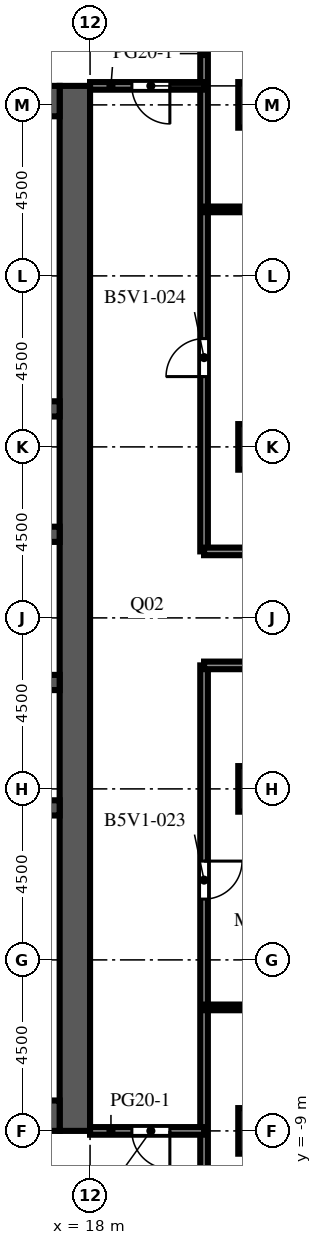
"""IFC4 building model, lengths in metres.
Left out: names, types, materials, properties, quantities, classifications, styles, units other than length and angle.
Written with IfcOpenShell. Run it as: python <this file> out.ifc"""

import sys

from ifc_helpers import new_model, si_unit, direction, frame, frame_2d, origin, origin_2d, place, context, subcontext, project, spatial, rectangle, extrude, element, fill, save


model = new_model("IFC4")
c1 = context("Model", 3, precision=1e-05, world=origin(), true_north=direction((0.0, 1.0)))
c2 = subcontext(c1, "Body", "Model", "MODEL_VIEW")
j1 = project(units=[si_unit("LENGTHUNIT", "METRE"), si_unit("PLANEANGLEUNIT", "RADIAN")], contexts=[c1])
p1 = place(None, origin())
s1 = spatial("IfcSite", under=j1, at=p1, CompositionType="ELEMENT")
p2 = place(p1, origin())
s2 = spatial("IfcBuilding", under=s1, at=p2, CompositionType="ELEMENT")
p3 = place(p2, frame((0.0, 0.0, 169.1)))
s3 = spatial("IfcBuildingStorey", under=s2, at=p3, CompositionType="ELEMENT", Elevation=169.1)
for number, where, z_axis, x_axis in (
    (1, (22.5, -9.0, 0.0), (0.0, 0.0, 1.0), (1.0, 0.0, 0.0)),
    (2, (22.5, 0.0, 0.0), (0.0, 0.0, 1.0), (1.0, 0.0, 0.0)),
    (3, (22.5, 9.0, 0.0), (0.0, 0.0, 1.0), (1.0, 0.0, 0.0)),
    (4, (22.5, 18.0, 0.0), (0.0, 0.0, 1.0), (1.0, 0.0, 0.0)),
):
    element("IfcColumn", number, at=place(p3, frame(where, z_axis=z_axis, x_axis=x_axis)), inside=s3, PredefinedType="COLUMN", context=c2, shape_type="SweptSolid", body=[
        extrude(rectangle(XDim=1.2, YDim=1.2, at=origin_2d()), origin(), (0.0, 0.0, 1.0), 4.1),
    ])
p4 = place(p3, frame((17.6, -9.0, 0.0), z_axis=(0.0, 0.0, 1.0), x_axis=(0.0, 1.0, 0.0)))
e5 = element("IfcWall", 5, at=p4, inside=s3, PredefinedType="SHEAR", context=c2, shape_type="SweptSolid", body=[
    extrude(rectangle(XDim=27.5, YDim=0.8, at=frame_2d((13.75, 0.0))), origin(), (0.0, 0.0, 1.0), 4.1),
])
p5 = place(p4, frame((12.55, 0.0, 0.0)))
e6 = element("IfcOpeningElement", 6, at=p5, cuts=e5, PredefinedType="OPENING", context=c2, shape_type="SweptSolid", body=[
    extrude(rectangle(XDim=2.4, YDim=2.4, at=frame_2d((1.2, 1.2))), frame((0.0, 0.41, 0.0), z_axis=(0.0, -1.0, 0.0), x_axis=(1.0, 0.0, 0.0)), (0.0, 0.0, 1.0), 0.82),
])
p6 = place(p4, frame((6.825, 0.0, 0.0)))
e7 = element("IfcOpeningElement", 7, at=p6, cuts=e5, PredefinedType="OPENING", context=c2, shape_type="SweptSolid", body=[
    extrude(rectangle(XDim=1.2, YDim=2.1, at=frame_2d((0.6, 1.05))), frame((0.0, 0.41, 0.0), z_axis=(0.0, -1.0, 0.0), x_axis=(1.0, 0.0, 0.0)), (0.0, 0.0, 1.0), 0.82),
])
p7 = place(p4, frame((19.475, 0.0, 0.0)))
e8 = element("IfcOpeningElement", 8, at=p7, cuts=e5, PredefinedType="OPENING", context=c2, shape_type="SweptSolid", body=[
    extrude(rectangle(XDim=1.2, YDim=2.1, at=frame_2d((0.6, 1.05))), frame((0.0, 0.41, 0.0), z_axis=(0.0, -1.0, 0.0), x_axis=(1.0, 0.0, 0.0)), (0.0, 0.0, 1.0), 0.82),
])
for number, where, z_axis, x_axis in (
    (9, (6.8, -8.6, 0.0), (0.0, 0.0, 1.0), (1.0, 0.0, 0.0)),
    (10, (6.8, 18.1, 0.0), (0.0, 0.0, 1.0), (1.0, 0.0, 0.0)),
):
    element("IfcWall", number, at=place(p3, frame(where, z_axis=z_axis, x_axis=x_axis)), inside=s3, PredefinedType="SHEAR", context=c2, shape_type="SweptSolid", body=[
        extrude(rectangle(XDim=10.4, YDim=0.8, at=frame_2d((5.2, 0.0))), origin(), (0.0, 0.0, 1.0), 4.1),
    ])
p8 = place(p3, frame((6.8, -0.5, 0.0), z_axis=(0.0, 0.0, 1.0), x_axis=(1.0, 0.0, 0.0)))
e11 = element("IfcWall", 11, at=p8, inside=s3, PredefinedType="SHEAR", context=c2, shape_type="SweptSolid", body=[
    extrude(rectangle(XDim=10.4, YDim=0.4, at=frame_2d((5.2, 0.0))), origin(), (0.0, 0.0, 1.0), 4.1),
])
p9 = place(p3, frame((6.8, 2.8, 0.0), z_axis=(0.0, 0.0, 1.0), x_axis=(1.0, 0.0, 0.0)))
e12 = element("IfcWall", 12, at=p9, inside=s3, PredefinedType="SHEAR", context=c2, shape_type="SweptSolid", body=[
    extrude(rectangle(XDim=10.4, YDim=0.4, at=frame_2d((5.2, 0.0))), origin(), (0.0, 0.0, 1.0), 4.1),
])
p10 = place(p9, frame((0.738, 0.0, 0.0)))
e13 = element("IfcOpeningElement", 13, at=p10, cuts=e12, PredefinedType="OPENING", context=c2, shape_type="SweptSolid", body=[
    extrude(rectangle(XDim=1.1, YDim=2.1, at=frame_2d((0.55, 1.05))), frame((0.0, 0.21, 0.0), z_axis=(0.0, -1.0, 0.0), x_axis=(1.0, 0.0, 0.0)), (0.0, 0.0, 1.0), 0.42),
])
p11 = place(p9, frame((3.337, 0.0, 0.0)))
e14 = element("IfcOpeningElement", 14, at=p11, cuts=e12, PredefinedType="OPENING", context=c2, shape_type="SweptSolid", body=[
    extrude(rectangle(XDim=1.1, YDim=2.1, at=frame_2d((0.55, 1.05))), frame((0.0, 0.21, 0.0), z_axis=(0.0, -1.0, 0.0), x_axis=(1.0, 0.0, 0.0)), (0.0, 0.0, 1.0), 0.42),
])
p12 = place(p9, frame((6.012, 0.0, 0.0)))
e15 = element("IfcOpeningElement", 15, at=p12, cuts=e12, PredefinedType="OPENING", context=c2, shape_type="SweptSolid", body=[
    extrude(rectangle(XDim=1.0, YDim=2.1, at=frame_2d((0.5, 1.05))), frame((0.0, 0.21, 0.0), z_axis=(0.0, -1.0, 0.0), x_axis=(1.0, 0.0, 0.0)), (0.0, 0.0, 1.0), 0.42),
])
p13 = place(p9, frame((8.613, 0.0, 0.0)))
e16 = element("IfcOpeningElement", 16, at=p13, cuts=e12, PredefinedType="OPENING", context=c2, shape_type="SweptSolid", body=[
    extrude(rectangle(XDim=1.0, YDim=2.1, at=frame_2d((0.5, 1.05))), frame((0.0, 0.21, 0.0), z_axis=(0.0, -1.0, 0.0), x_axis=(1.0, 0.0, 0.0)), (0.0, 0.0, 1.0), 0.42),
])
p14 = place(p3, frame((6.8, 6.7, 0.0), z_axis=(0.0, 0.0, 1.0), x_axis=(1.0, 0.0, 0.0)))
e17 = element("IfcWall", 17, at=p14, inside=s3, PredefinedType="SHEAR", context=c2, shape_type="SweptSolid", body=[
    extrude(rectangle(XDim=10.4, YDim=0.4, at=frame_2d((5.2, 0.0))), origin(), (0.0, 0.0, 1.0), 4.1),
])
p15 = place(p14, frame((3.337, 0.0, 0.0)))
e18 = element("IfcOpeningElement", 18, at=p15, cuts=e17, PredefinedType="OPENING", context=c2, shape_type="SweptSolid", body=[
    extrude(rectangle(XDim=1.1, YDim=2.1, at=frame_2d((0.55, 1.05))), frame((0.0, 0.21, 0.0), z_axis=(0.0, -1.0, 0.0), x_axis=(1.0, 0.0, 0.0)), (0.0, 0.0, 1.0), 0.42),
])
p16 = place(p14, frame((5.962, 0.0, 0.0)))
e19 = element("IfcOpeningElement", 19, at=p16, cuts=e17, PredefinedType="OPENING", context=c2, shape_type="SweptSolid", body=[
    extrude(rectangle(XDim=1.1, YDim=2.1, at=frame_2d((0.55, 1.05))), frame((0.0, 0.21, 0.0), z_axis=(0.0, -1.0, 0.0), x_axis=(1.0, 0.0, 0.0)), (0.0, 0.0, 1.0), 0.42),
])
p17 = place(p14, frame((8.663, 0.0, 0.0)))
e20 = element("IfcOpeningElement", 20, at=p17, cuts=e17, PredefinedType="OPENING", context=c2, shape_type="SweptSolid", body=[
    extrude(rectangle(XDim=1.1, YDim=2.1, at=frame_2d((0.55, 1.05))), frame((0.0, 0.21, 0.0), z_axis=(0.0, -1.0, 0.0), x_axis=(1.0, 0.0, 0.0)), (0.0, 0.0, 1.0), 0.42),
])
p18 = place(p14, frame((0.688, 0.0, 0.0)))
e21 = element("IfcOpeningElement", 21, at=p18, cuts=e17, PredefinedType="OPENING", context=c2, shape_type="SweptSolid", body=[
    extrude(rectangle(XDim=1.0, YDim=2.1, at=frame_2d((0.5, 1.05))), frame((0.0, 0.21, 0.0), z_axis=(0.0, -1.0, 0.0), x_axis=(1.0, 0.0, 0.0)), (0.0, 0.0, 1.0), 0.42),
])
p19 = place(p3, frame((6.8, 10.0, 0.0), z_axis=(0.0, 0.0, 1.0), x_axis=(1.0, 0.0, 0.0)))
e22 = element("IfcWall", 22, at=p19, inside=s3, PredefinedType="SHEAR", context=c2, shape_type="SweptSolid", body=[
    extrude(rectangle(XDim=10.4, YDim=0.4, at=frame_2d((5.2, 0.0))), origin(), (0.0, 0.0, 1.0), 4.1),
])
p20 = place(p3, frame((21.0, 3.25, 0.0), z_axis=(0.0, 0.0, 1.0), x_axis=(0.0, -1.0, 0.0)))
e23 = element("IfcWall", 23, at=p20, inside=s3, PredefinedType="PARTITIONING", context=c2, shape_type="SweptSolid", body=[
    extrude(rectangle(XDim=30.1, YDim=0.2, at=frame_2d((15.05, 0.0))), origin(), (0.0, 0.0, 1.0), 3.65),
])
p21 = place(p20, frame((5.15, 0.0, 0.0)))
e24 = element("IfcOpeningElement", 24, at=p21, cuts=e23, PredefinedType="OPENING", context=c2, shape_type="SweptSolid", body=[
    extrude(rectangle(XDim=1.0, YDim=2.1, at=frame_2d((0.5, 1.05))), frame((0.0, 0.11, 0.0), z_axis=(0.0, -1.0, 0.0), x_axis=(1.0, 0.0, 0.0)), (0.0, 0.0, 1.0), 0.22),
])
p22 = place(p3, frame((21.0, 26.85, 0.0), z_axis=(0.0, 0.0, 1.0), x_axis=(0.0, -1.0, 0.0)))
e25 = element("IfcWall", 25, at=p22, inside=s3, PredefinedType="PARTITIONING", context=c2, shape_type="SweptSolid", body=[
    extrude(rectangle(XDim=20.6, YDim=0.2, at=frame_2d((10.3, 0.0))), origin(), (0.0, 0.0, 1.0), 3.65),
])
p23 = place(p22, frame((15.0, 0.0, 0.0)))
e26 = element("IfcOpeningElement", 26, at=p23, cuts=e25, PredefinedType="OPENING", context=c2, shape_type="SweptSolid", body=[
    extrude(rectangle(XDim=1.0, YDim=2.1, at=frame_2d((0.5, 1.05))), frame((0.0, 0.11, 0.0), z_axis=(0.0, -1.0, 0.0), x_axis=(1.0, 0.0, 0.0)), (0.0, 0.0, 1.0), 0.22),
])
p24 = place(p3, frame((21.0, -9.0, 0.0), z_axis=(0.0, 0.0, 1.0), x_axis=(-1.0, 0.0, 0.0)))
e27 = element("IfcWall", 27, at=p24, inside=s3, PredefinedType="PARTITIONING", context=c2, shape_type="SweptSolid", body=[
    extrude(rectangle(XDim=3.0, YDim=0.2, at=frame_2d((1.5, 0.0))), origin(), (0.0, 0.0, 1.0), 3.65),
])
p25 = place(p24, frame((0.9, 0.0, 0.0)))
e28 = element("IfcOpeningElement", 28, at=p25, cuts=e27, PredefinedType="OPENING", context=c2, shape_type="SweptSolid", body=[
    extrude(rectangle(XDim=1.0, YDim=2.1, at=frame_2d((0.5, 1.05))), frame((0.0, 0.11, 0.0), z_axis=(0.0, -1.0, 0.0), x_axis=(1.0, 0.0, 0.0)), (0.0, 0.0, 1.0), 0.22),
])
p26 = place(p3, frame((26.85, -5.75, 0.0), z_axis=(0.0, 0.0, 1.0), x_axis=(-1.0, 0.0, 0.0)))
e29 = element("IfcWall", 29, at=p26, inside=s3, PredefinedType="PARTITIONING", context=c2, shape_type="SweptSolid", body=[
    extrude(rectangle(XDim=5.85, YDim=0.15, at=frame_2d((2.925, 0.0))), origin(), (0.0, 0.0, 1.0), 3.65),
])
p27 = place(p26, frame((2.25, 0.0, 0.0)))
e30 = element("IfcOpeningElement", 30, at=p27, cuts=e29, PredefinedType="OPENING", context=c2, shape_type="SweptSolid", body=[
    extrude(rectangle(XDim=1.0, YDim=2.1, at=frame_2d((0.5, 1.05))), frame((0.0, 0.085, 0.0), z_axis=(0.0, -1.0, 0.0), x_axis=(1.0, 0.0, 0.0)), (0.0, 0.0, 1.0), 0.17),
])
for number, where, z_axis, x_axis in (
    (31, (21.0, 3.25, 0.0), (0.0, 0.0, 1.0), (1.0, 0.0, 0.0)),
    (32, (21.0, 6.25, 0.0), (0.0, 0.0, 1.0), (1.0, 0.0, 0.0)),
):
    element("IfcWall", number, at=place(p3, frame(where, z_axis=z_axis, x_axis=x_axis)), inside=s3, PredefinedType="PARTITIONING", context=c2, shape_type="SweptSolid", body=[
        extrude(rectangle(XDim=5.85, YDim=0.2, at=frame_2d((2.925, 0.0))), origin(), (0.0, 0.0, 1.0), 3.65),
    ])
p28 = place(p3, frame((21.0, 15.25, 0.0), z_axis=(0.0, 0.0, 1.0), x_axis=(1.0, 0.0, 0.0)))
e33 = element("IfcWall", 33, at=p28, inside=s3, PredefinedType="PARTITIONING", context=c2, shape_type="SweptSolid", body=[
    extrude(rectangle(XDim=5.85, YDim=0.15, at=frame_2d((2.925, 0.0))), origin(), (0.0, 0.0, 1.0), 3.65),
])
p29 = place(p28, frame((3.1, 0.0, 0.0)))
e34 = element("IfcOpeningElement", 34, at=p29, cuts=e33, PredefinedType="OPENING", context=c2, shape_type="SweptSolid", body=[
    extrude(rectangle(XDim=1.0, YDim=2.1, at=frame_2d((0.5, 1.05))), frame((0.0, 0.085, 0.0), z_axis=(0.0, -1.0, 0.0), x_axis=(1.0, 0.0, 0.0)), (0.0, 0.0, 1.0), 0.17),
])
p30 = place(p3, frame((18.0, 18.5, 0.0), z_axis=(0.0, 0.0, 1.0), x_axis=(1.0, 0.0, 0.0)))
e35 = element("IfcWall", 35, at=p30, inside=s3, PredefinedType="PARTITIONING", context=c2, shape_type="SweptSolid", body=[
    extrude(rectangle(XDim=3.0, YDim=0.2, at=frame_2d((1.5, 0.0))), origin(), (0.0, 0.0, 1.0), 3.65),
])
p31 = place(p30, frame((1.1, 0.0, 0.0)))
e36 = element("IfcOpeningElement", 36, at=p31, cuts=e35, PredefinedType="OPENING", context=c2, shape_type="SweptSolid", body=[
    extrude(rectangle(XDim=1.0, YDim=2.1, at=frame_2d((0.5, 1.05))), frame((0.0, 0.11, 0.0), z_axis=(0.0, -1.0, 0.0), x_axis=(1.0, 0.0, 0.0)), (0.0, 0.0, 1.0), 0.22),
])
p32 = place(p5, origin())
e37 = element("IfcDoor", 37, at=p32, inside=s3, OperationType="DOUBLE_DOOR_DOUBLE_SWING", PredefinedType="DOOR", context=c2, shape_type="SweptSolid", body=[
    extrude(rectangle(XDim=2.4, YDim=2.4, at=frame_2d((1.2, 1.2))), frame((0.0, 0.025, 0.0), z_axis=(0.0, -1.0, 0.0), x_axis=(1.0, 0.0, 0.0)), (0.0, 0.0, 1.0), 0.05),
])
fill(e6, e37)
p33 = place(p6, frame((1.2, 0.0, 0.0), z_axis=(0.0, 0.0, 1.0), x_axis=(-1.0, 0.0, 0.0)))
e38 = element("IfcDoor", 38, at=p33, inside=s3, OperationType="SINGLE_SWING_LEFT", PredefinedType="DOOR", context=c2, shape_type="SweptSolid", body=[
    extrude(rectangle(XDim=1.2, YDim=2.1, at=frame_2d((0.6, 1.05))), frame((0.0, 0.025, 0.0), z_axis=(0.0, -1.0, 0.0), x_axis=(1.0, 0.0, 0.0)), (0.0, 0.0, 1.0), 0.05),
])
fill(e7, e38)
p34 = place(p7, frame((1.2, 0.0, 0.0), z_axis=(0.0, 0.0, 1.0), x_axis=(-1.0, 0.0, 0.0)))
e39 = element("IfcDoor", 39, at=p34, inside=s3, OperationType="SINGLE_SWING_LEFT", PredefinedType="DOOR", context=c2, shape_type="SweptSolid", body=[
    extrude(rectangle(XDim=1.2, YDim=2.1, at=frame_2d((0.6, 1.05))), frame((0.0, 0.025, 0.0), z_axis=(0.0, -1.0, 0.0), x_axis=(1.0, 0.0, 0.0)), (0.0, 0.0, 1.0), 0.05),
])
fill(e8, e39)
p35 = place(p25, origin())
e40 = element("IfcDoor", 40, at=p35, inside=s3, OperationType="SINGLE_SWING_LEFT", PredefinedType="DOOR", context=c2, shape_type="SweptSolid", body=[
    extrude(rectangle(XDim=1.0, YDim=2.1, at=frame_2d((0.5, 1.05))), frame((0.0, 0.025, 0.0), z_axis=(0.0, -1.0, 0.0), x_axis=(1.0, 0.0, 0.0)), (0.0, 0.0, 1.0), 0.05),
])
fill(e28, e40)
p36 = place(p31, origin())
e41 = element("IfcDoor", 41, at=p36, inside=s3, OperationType="SINGLE_SWING_RIGHT", PredefinedType="DOOR", context=c2, shape_type="SweptSolid", body=[
    extrude(rectangle(XDim=1.0, YDim=2.1, at=frame_2d((0.5, 1.05))), frame((0.0, 0.025, 0.0), z_axis=(0.0, -1.0, 0.0), x_axis=(1.0, 0.0, 0.0)), (0.0, 0.0, 1.0), 0.05),
])
fill(e36, e41)
p37 = place(p21, origin())
e42 = element("IfcDoor", 42, at=p37, inside=s3, OperationType="SINGLE_SWING_LEFT", PredefinedType="DOOR", context=c2, shape_type="SweptSolid", body=[
    extrude(rectangle(XDim=1.0, YDim=2.1, at=frame_2d((0.5, 1.05))), frame((0.0, 0.025, 0.0), z_axis=(0.0, -1.0, 0.0), x_axis=(1.0, 0.0, 0.0)), (0.0, 0.0, 1.0), 0.05),
])
fill(e24, e42)
p38 = place(p23, origin())
e43 = element("IfcDoor", 43, at=p38, inside=s3, OperationType="SINGLE_SWING_RIGHT", PredefinedType="DOOR", context=c2, shape_type="SweptSolid", body=[
    extrude(rectangle(XDim=1.0, YDim=2.1, at=frame_2d((0.5, 1.05))), frame((0.0, 0.025, 0.0), z_axis=(0.0, -1.0, 0.0), x_axis=(1.0, 0.0, 0.0)), (0.0, 0.0, 1.0), 0.05),
])
fill(e26, e43)
save(model, sys.argv[1])
